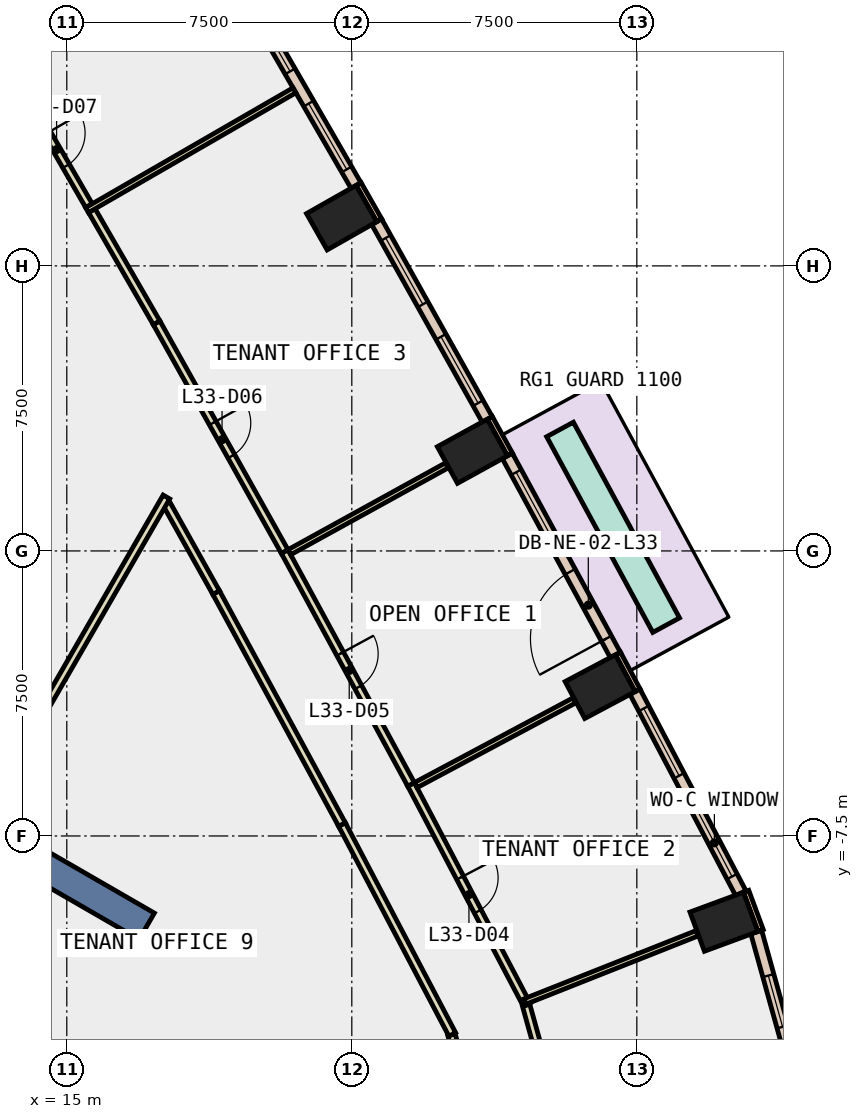
"""IFC4 building model, lengths in metres.
Left out: names, types, materials, properties, quantities, classifications, styles, units other than length and angle.
Written with IfcOpenShell. Run it as: python <this file> out.ifc"""

import sys

from ifc_helpers import new_model, si_unit, direction, frame, frame_2d, origin, origin_2d, place, context, subcontext, project, spatial, rectangle, extrude, element, fill, save


model = new_model("IFC4")
c1 = context("Model", 3, precision=1e-05, world=origin(), true_north=direction((0.0, 1.0)))
c2 = subcontext(c1, "Body", "Model", "MODEL_VIEW")
j1 = project(units=[si_unit("LENGTHUNIT", "METRE"), si_unit("PLANEANGLEUNIT", "RADIAN")], contexts=[c1])
p1 = place(None, origin())
s1 = spatial("IfcSite", under=j1, at=p1, CompositionType="ELEMENT")
p2 = place(p1, origin())
s2 = spatial("IfcBuilding", under=s1, at=p2, CompositionType="ELEMENT")
p3 = place(p2, frame((0.0, 0.0, 150.8)))
s3 = spatial("IfcBuildingStorey", under=s2, at=p3, CompositionType="ELEMENT", Elevation=150.8)
for number, where, z_axis, x_axis in (
    (1, (32.292, -9.758, -0.4), (0.0, 0.0, 1.0), (-0.347, 0.938, 0.0)),
    (2, (29.034, -3.571, -0.4), (0.0, 0.0, 1.0), (-0.47, 0.883, 0.0)),
    (3, (25.673, 2.622, -0.4), (0.0, 0.0, 1.0), (-0.482, 0.876, 0.0)),
    (4, (22.232, 8.769, -0.4), (0.0, 0.0, 1.0), (-0.494, 0.869, 0.0)),
):
    element("IfcColumn", number, at=place(p3, frame(where, z_axis=z_axis, x_axis=x_axis)), inside=s3, PredefinedType="COLUMN", context=c2, shape_type="SweptSolid", body=[
        extrude(rectangle(XDim=1.1, YDim=1.5, at=origin_2d()), origin(), (0.0, 0.0, 1.0), 4.2),
    ])
p4 = place(p3, frame((9.31, -5.375, -0.4), z_axis=(0.0, 0.0, 1.0), x_axis=(0.866017533419, -0.500013631625, 0.0)))
e5 = element("IfcWall", 5, at=p4, inside=s3, PredefinedType="SHEAR", context=c2, shape_type="SweptSolid", body=[
    extrude(rectangle(XDim=9.0, YDim=0.8, at=frame_2d((4.5, 0.0))), origin(), (0.0, 0.0, 1.0), 4.2),
])
for number, where, z_axis, x_axis in (
    (6, (33.256, -9.988, 0.0), (0.0, 0.0, 1.0), (-0.346, 0.938, 0.0)),
    (7, (30.02, -3.669, 0.0), (0.0, 0.0, 1.0), (-0.47, 0.883, 0.0)),
):
    element("IfcWall", number, at=place(p3, frame(where, z_axis=z_axis, x_axis=x_axis)), inside=s3, PredefinedType="STANDARD", context=c2, shape_type="SweptSolid", body=[
        extrude(rectangle(XDim=1.1, YDim=0.15, at=frame_2d((0.55, 0.0))), origin(), (0.0, 0.0, 1.0), 3.8),
    ])
for number, where, z_axis, x_axis in (
    (8, (26.661, 2.538, 0.0), (0.0, 0.0, 1.0), (-0.482, 0.876, 0.0)),
    (9, (23.222, 8.699, 0.0), (0.0, 0.0, 1.0), (-0.495, 0.869, 0.0)),
):
    element("IfcWall", number, at=place(p3, frame(where, z_axis=z_axis, x_axis=x_axis)), inside=s3, PredefinedType="STANDARD", context=c2, shape_type="SweptSolid", body=[
        extrude(rectangle(XDim=1.1, YDim=0.15, at=frame_2d((0.55, 0.0))), origin(), (0.0, 0.0, 1.0), 3.8),
    ])
p5 = place(p3, frame((34.154, -13.667, 0.0), z_axis=(0.0, 0.0, 1.0), x_axis=(-0.26799398221, 0.963420585985, 0.0)))
e10 = element("IfcWall", 10, at=p5, inside=s3, PredefinedType="STANDARD", context=c2, shape_type="SweptSolid", body=[
    extrude(rectangle(XDim=3.776, YDim=0.3, at=frame_2d((1.888, 0.0))), origin(), (0.0, 0.0, 1.0), 3.8),
])
p6 = place(p5, frame((1.188, 0.0, 0.9)))
e11 = element("IfcOpeningElement", 11, at=p6, cuts=e10, PredefinedType="OPENING", context=c2, shape_type="SweptSolid", body=[
    extrude(rectangle(XDim=1.4, YDim=2.6, at=frame_2d((0.7, 1.3))), frame((0.0, 0.16, 0.0), z_axis=(0.0, -1.0, 0.0), x_axis=(1.0, 0.0, 0.0)), (0.0, 0.0, 1.0), 0.32),
])
p7 = place(p3, frame((32.737, -9.008, 0.0), z_axis=(0.0, 0.0, 1.0), x_axis=(-0.465104650407, 0.885255705528, 0.0)))
e12 = element("IfcWall", 12, at=p7, inside=s3, PredefinedType="STANDARD", context=c2, shape_type="SweptSolid", body=[
    extrude(rectangle(XDim=5.99, YDim=0.3, at=frame_2d((2.995, 0.0))), origin(), (0.0, 0.0, 1.0), 3.8),
])
p8 = place(p7, frame((0.498, 0.0, 0.9)))
e13 = element("IfcOpeningElement", 13, at=p8, cuts=e12, PredefinedType="OPENING", context=c2, shape_type="SweptSolid", body=[
    extrude(rectangle(XDim=2.0, YDim=2.6, at=frame_2d((1.0, 1.3))), frame((0.0, 0.16, 0.0), z_axis=(0.0, -1.0, 0.0), x_axis=(1.0, 0.0, 0.0)), (0.0, 0.0, 1.0), 0.32),
])
p9 = place(p7, frame((3.493, 0.0, 0.9)))
e14 = element("IfcOpeningElement", 14, at=p9, cuts=e12, PredefinedType="OPENING", context=c2, shape_type="SweptSolid", body=[
    extrude(rectangle(XDim=2.0, YDim=2.6, at=frame_2d((1.0, 1.3))), frame((0.0, 0.16, 0.0), z_axis=(0.0, -1.0, 0.0), x_axis=(1.0, 0.0, 0.0)), (0.0, 0.0, 1.0), 0.32),
])
p10 = place(p3, frame((29.434, -2.736, 0.0), z_axis=(0.0, 0.0, 1.0), x_axis=(-0.476970695077, 0.878919197673, 0.0)))
e15 = element("IfcWall", 15, at=p10, inside=s3, PredefinedType="STANDARD", context=c2, shape_type="SweptSolid", body=[
    extrude(rectangle(XDim=5.958, YDim=0.3, at=frame_2d((2.979, 0.0))), origin(), (0.0, 0.0, 1.0), 3.8),
])
p11 = place(p10, frame((0.49, 0.0, 0.0)))
e16 = element("IfcOpeningElement", 16, at=p11, cuts=e15, PredefinedType="OPENING", context=c2, shape_type="SweptSolid", body=[
    extrude(rectangle(XDim=2.0, YDim=2.4, at=frame_2d((1.0, 1.2))), frame((0.0, 0.16, 0.0), z_axis=(0.0, -1.0, 0.0), x_axis=(1.0, 0.0, 0.0)), (0.0, 0.0, 1.0), 0.32),
])
p12 = place(p10, frame((3.469, 0.0, 0.9)))
e17 = element("IfcOpeningElement", 17, at=p12, cuts=e15, PredefinedType="OPENING", context=c2, shape_type="SweptSolid", body=[
    extrude(rectangle(XDim=2.0, YDim=2.6, at=frame_2d((1.0, 1.3))), frame((0.0, 0.16, 0.0), z_axis=(0.0, -1.0, 0.0), x_axis=(1.0, 0.0, 0.0)), (0.0, 0.0, 1.0), 0.32),
])
p13 = place(p3, frame((26.062, 3.463, 0.0), z_axis=(0.0, 0.0, 1.0), x_axis=(-0.488354983501, 0.872645065356, 0.0)))
e18 = element("IfcWall", 18, at=p13, inside=s3, PredefinedType="STANDARD", context=c2, shape_type="SweptSolid", body=[
    extrude(rectangle(XDim=5.957, YDim=0.3, at=frame_2d((2.978, 0.0))), origin(), (0.0, 0.0, 1.0), 3.8),
])
p14 = place(p13, frame((0.489, 0.0, 0.9)))
e19 = element("IfcOpeningElement", 19, at=p14, cuts=e18, PredefinedType="OPENING", context=c2, shape_type="SweptSolid", body=[
    extrude(rectangle(XDim=2.0, YDim=2.6, at=frame_2d((1.0, 1.3))), frame((0.0, 0.16, 0.0), z_axis=(0.0, -1.0, 0.0), x_axis=(1.0, 0.0, 0.0)), (0.0, 0.0, 1.0), 0.32),
])
p15 = place(p13, frame((3.467, 0.0, 0.9)))
e20 = element("IfcOpeningElement", 20, at=p15, cuts=e18, PredefinedType="OPENING", context=c2, shape_type="SweptSolid", body=[
    extrude(rectangle(XDim=2.0, YDim=2.6, at=frame_2d((1.0, 1.3))), frame((0.0, 0.16, 0.0), z_axis=(0.0, -1.0, 0.0), x_axis=(1.0, 0.0, 0.0)), (0.0, 0.0, 1.0), 0.32),
])
p16 = place(p3, frame((22.61, 9.615, 0.0), z_axis=(0.0, 0.0, 1.0), x_axis=(-0.500061823953, 0.865989706766, 0.0)))
e21 = element("IfcWall", 21, at=p16, inside=s3, PredefinedType="STANDARD", context=c2, shape_type="SweptSolid", body=[
    extrude(rectangle(XDim=5.957, YDim=0.3, at=frame_2d((2.979, 0.0))), origin(), (0.0, 0.0, 1.0), 3.8),
])
p17 = place(p16, frame((0.489, 0.0, 0.9)))
e22 = element("IfcOpeningElement", 22, at=p17, cuts=e21, PredefinedType="OPENING", context=c2, shape_type="SweptSolid", body=[
    extrude(rectangle(XDim=2.0, YDim=2.6, at=frame_2d((1.0, 1.3))), frame((0.0, 0.16, 0.0), z_axis=(0.0, -1.0, 0.0), x_axis=(1.0, 0.0, 0.0)), (0.0, 0.0, 1.0), 0.32),
])
p18 = place(p16, frame((3.468, 0.0, 0.9)))
e23 = element("IfcOpeningElement", 23, at=p18, cuts=e21, PredefinedType="OPENING", context=c2, shape_type="SweptSolid", body=[
    extrude(rectangle(XDim=2.0, YDim=2.6, at=frame_2d((1.0, 1.3))), frame((0.0, 0.16, 0.0), z_axis=(0.0, -1.0, 0.0), x_axis=(1.0, 0.0, 0.0)), (0.0, 0.0, 1.0), 0.32),
])
p19 = place(p3, frame((30.772, -1.953, 0.0), z_axis=(0.0, 0.0, 1.0), x_axis=(-0.476806707813, 0.87900817026, 0.0)))
e24 = element("IfcWall", 24, at=p19, inside=s3, PredefinedType="STANDARD", context=c2, shape_type="SweptSolid", body=[
    extrude(rectangle(XDim=5.858, YDim=0.8, at=frame_2d((2.929, 0.0))), origin(), (0.0, 0.0, 1.0), 0.8),
])
p20 = place(p3, frame((25.586, -14.393, 0.0), z_axis=(0.0, 0.0, 1.0), x_axis=(-0.268139825244, 0.963380005044, 0.0)))
e25 = element("IfcWall", 25, at=p20, inside=s3, PredefinedType="PARTITIONING", context=c2, shape_type="SweptSolid", body=[
    extrude(rectangle(XDim=1.726, YDim=0.2, at=frame_2d((0.863, 0.0))), origin(), (0.0, 0.0, 1.0), 3.8),
])
p21 = place(p3, frame((25.143, -12.722, 0.0), z_axis=(0.0, 0.0, 1.0), x_axis=(-0.465089990515, 0.885263407536, 0.0)))
e26 = element("IfcWall", 26, at=p21, inside=s3, PredefinedType="PARTITIONING", context=c2, shape_type="SweptSolid", body=[
    extrude(rectangle(XDim=6.24, YDim=0.2, at=frame_2d((3.12, 0.0))), origin(), (0.0, 0.0, 1.0), 3.8),
])
p22 = place(p3, frame((22.241, -7.198, 0.0), z_axis=(0.0, 0.0, 1.0), x_axis=(-0.476865268044, 0.878976402489, 0.0)))
e27 = element("IfcWall", 27, at=p22, inside=s3, PredefinedType="PARTITIONING", context=c2, shape_type="SweptSolid", body=[
    extrude(rectangle(XDim=6.943, YDim=0.2, at=frame_2d((3.472, 0.0))), origin(), (0.0, 0.0, 1.0), 3.8),
])
p23 = place(p3, frame((18.93, -1.095, 0.0), z_axis=(0.0, 0.0, 1.0), x_axis=(-0.488268004118, 0.872693735599, 0.0)))
e28 = element("IfcWall", 28, at=p23, inside=s3, PredefinedType="PARTITIONING", context=c2, shape_type="SweptSolid", body=[
    extrude(rectangle(XDim=2.683, YDim=0.2, at=frame_2d((1.341, 0.0))), origin(), (0.0, 0.0, 1.0), 3.8),
])
p24 = place(p3, frame((27.086, -11.952, 0.0), z_axis=(0.0, 0.0, 1.0), x_axis=(0.267909096687, -0.963444194498, 0.0)))
e29 = element("IfcWall", 29, at=p24, inside=s3, PredefinedType="PARTITIONING", context=c2, shape_type="SweptSolid", body=[
    extrude(rectangle(XDim=2.516, YDim=0.2, at=frame_2d((1.258, 0.0))), origin(), (0.0, 0.0, 1.0), 3.8),
])
p25 = place(p3, frame((24.059, -6.143, 0.0), z_axis=(0.0, 0.0, 1.0), x_axis=(0.464993808059, -0.885313932154, 0.0)))
e30 = element("IfcWall", 30, at=p25, inside=s3, PredefinedType="PARTITIONING", context=c2, shape_type="SweptSolid", body=[
    extrude(rectangle(XDim=6.552, YDim=0.2, at=frame_2d((3.276, 0.0))), origin(), (0.0, 0.0, 1.0), 3.8),
])
p26 = place(p25, frame((2.776, 0.0, 0.0)))
e31 = element("IfcOpeningElement", 31, at=p26, cuts=e30, PredefinedType="OPENING", context=c2, shape_type="SweptSolid", body=[
    extrude(rectangle(XDim=1.0, YDim=2.1, at=frame_2d((0.5, 1.05))), frame((0.0, 0.11, 0.0), z_axis=(0.0, -1.0, 0.0), x_axis=(1.0, 0.0, 0.0)), (0.0, 0.0, 1.0), 0.22),
])
p27 = place(p3, frame((20.733, -0.016, 0.0), z_axis=(0.0, 0.0, 1.0), x_axis=(0.477104227839, -0.87884671916, 0.0)))
e32 = element("IfcWall", 32, at=p27, inside=s3, PredefinedType="PARTITIONING", context=c2, shape_type="SweptSolid", body=[
    extrude(rectangle(XDim=6.972, YDim=0.2, at=frame_2d((3.486, 0.0))), origin(), (0.0, 0.0, 1.0), 3.8),
])
p28 = place(p27, frame((3.061, 0.0, 0.0)))
e33 = element("IfcOpeningElement", 33, at=p28, cuts=e32, PredefinedType="OPENING", context=c2, shape_type="SweptSolid", body=[
    extrude(rectangle(XDim=1.0, YDim=2.1, at=frame_2d((0.5, 1.05))), frame((0.0, 0.11, 0.0), z_axis=(0.0, -1.0, 0.0), x_axis=(1.0, 0.0, 0.0)), (0.0, 0.0, 1.0), 0.22),
])
p29 = place(p3, frame((15.659, 8.954, 0.0), z_axis=(0.0, 0.0, 1.0), x_axis=(0.50001992892, -0.866013897511, 0.0)))
e34 = element("IfcWall", 34, at=p29, inside=s3, PredefinedType="PARTITIONING", context=c2, shape_type="SweptSolid", body=[
    extrude(rectangle(XDim=3.41, YDim=0.2, at=frame_2d((1.705, 0.0))), origin(), (0.0, 0.0, 1.0), 3.8),
])
p30 = place(p3, frame((17.364, 6.001, 0.0), z_axis=(0.0, 0.0, 1.0), x_axis=(0.488528981592, -0.872547668695, 0.0)))
e35 = element("IfcWall", 35, at=p30, inside=s3, PredefinedType="PARTITIONING", context=c2, shape_type="SweptSolid", body=[
    extrude(rectangle(XDim=6.896, YDim=0.2, at=frame_2d((3.448, 0.0))), origin(), (0.0, 0.0, 1.0), 3.8),
])
p31 = place(p30, frame((3.023, 0.0, 0.0)))
e36 = element("IfcOpeningElement", 36, at=p31, cuts=e35, PredefinedType="OPENING", context=c2, shape_type="SweptSolid", body=[
    extrude(rectangle(XDim=1.0, YDim=2.1, at=frame_2d((0.5, 1.05))), frame((0.0, 0.11, 0.0), z_axis=(0.0, -1.0, 0.0), x_axis=(1.0, 0.0, 0.0)), (0.0, 0.0, 1.0), 0.22),
])
p32 = place(p3, frame((13.879, 12.037, 0.0), z_axis=(0.0, 0.0, 1.0), x_axis=(0.50001992892, -0.866013897511, 0.0)))
e37 = element("IfcWall", 37, at=p32, inside=s3, PredefinedType="PARTITIONING", context=c2, shape_type="SweptSolid", body=[
    extrude(rectangle(XDim=3.41, YDim=0.2, at=frame_2d((1.705, 0.0))), origin(), (0.0, 0.0, 1.0), 3.8),
])
p33 = place(p32, frame((1.205, 0.0, 0.0)))
e38 = element("IfcOpeningElement", 38, at=p33, cuts=e37, PredefinedType="OPENING", context=c2, shape_type="SweptSolid", body=[
    extrude(rectangle(XDim=1.0, YDim=2.1, at=frame_2d((0.5, 1.05))), frame((0.0, 0.11, 0.0), z_axis=(0.0, -1.0, 0.0), x_axis=(1.0, 0.0, 0.0)), (0.0, 0.0, 1.0), 0.22),
])
p34 = place(p3, frame((17.621, 1.42, 0.0), z_axis=(0.0, 0.0, 1.0), x_axis=(-0.499987708133, -0.866032500381, 0.0)))
e39 = element("IfcWall", 39, at=p34, inside=s3, PredefinedType="PARTITIONING", context=c2, shape_type="SweptSolid", body=[
    extrude(rectangle(XDim=9.64, YDim=0.2, at=frame_2d((4.82, 0.0))), origin(), (0.0, 0.0, 1.0), 3.8),
])
p35 = place(p3, frame((27.059, -11.855, 0.0), z_axis=(0.0, 0.0, 1.0), x_axis=(0.92964843089, 0.368447818481, 0.0)))
e40 = element("IfcWall", 40, at=p35, inside=s3, PredefinedType="PARTITIONING", context=c2, shape_type="SweptSolid", body=[
    extrude(rectangle(XDim=4.866, YDim=0.15, at=frame_2d((2.433, 0.0))), origin(), (0.0, 0.0, 1.0), 3.8),
])
p36 = place(p3, frame((24.182, -6.162, 0.0), z_axis=(0.0, 0.0, 1.0), x_axis=(0.88214427755, 0.470979270866, 0.0)))
e41 = element("IfcWall", 41, at=p36, inside=s3, PredefinedType="PARTITIONING", context=c2, shape_type="SweptSolid", body=[
    extrude(rectangle(XDim=4.731, YDim=0.15, at=frame_2d((2.365, 0.0))), origin(), (0.0, 0.0, 1.0), 3.8),
])
p37 = place(p3, frame((20.857, -0.033, 0.0), z_axis=(0.0, 0.0, 1.0), x_axis=(0.875786153174, 0.482699299677, 0.0)))
e42 = element("IfcWall", 42, at=p37, inside=s3, PredefinedType="PARTITIONING", context=c2, shape_type="SweptSolid", body=[
    extrude(rectangle(XDim=4.729, YDim=0.15, at=frame_2d((2.365, 0.0))), origin(), (0.0, 0.0, 1.0), 3.8),
])
p38 = place(p3, frame((15.535, 8.969, 0.0), z_axis=(0.0, 0.0, 1.0), x_axis=(0.865951968193, 0.500127172609, 0.0)))
e43 = element("IfcWall", 43, at=p38, inside=s3, PredefinedType="PARTITIONING", context=c2, shape_type="SweptSolid", body=[
    extrude(rectangle(XDim=6.301, YDim=0.15, at=frame_2d((3.15, 0.0))), origin(), (0.0, 0.0, 1.0), 3.8),
])
p39 = place(p6, origin())
e44 = element("IfcWindow", 44, at=p39, inside=s3, PartitioningType="SINGLE_PANEL", PredefinedType="WINDOW", context=c2, shape_type="SweptSolid", body=[
    extrude(rectangle(XDim=1.4, YDim=2.6, at=frame_2d((0.7, 1.3))), frame((0.0, 0.03, 0.0), z_axis=(0.0, -1.0, 0.0), x_axis=(1.0, 0.0, 0.0)), (0.0, 0.0, 1.0), 0.06),
])
fill(e11, e44)
p40 = place(p8, origin())
e45 = element("IfcWindow", 45, at=p40, inside=s3, PartitioningType="SINGLE_PANEL", PredefinedType="WINDOW", context=c2, shape_type="SweptSolid", body=[
    extrude(rectangle(XDim=2.0, YDim=2.6, at=frame_2d((1.0, 1.3))), frame((0.0, 0.03, 0.0), z_axis=(0.0, -1.0, 0.0), x_axis=(1.0, 0.0, 0.0)), (0.0, 0.0, 1.0), 0.06),
])
fill(e13, e45)
p41 = place(p9, origin())
e46 = element("IfcWindow", 46, at=p41, inside=s3, PartitioningType="SINGLE_PANEL", PredefinedType="WINDOW", context=c2, shape_type="SweptSolid", body=[
    extrude(rectangle(XDim=2.0, YDim=2.6, at=frame_2d((1.0, 1.3))), frame((0.0, 0.03, 0.0), z_axis=(0.0, -1.0, 0.0), x_axis=(1.0, 0.0, 0.0)), (0.0, 0.0, 1.0), 0.06),
])
fill(e14, e46)
p42 = place(p11, origin())
e47 = element("IfcDoor", 47, at=p42, inside=s3, OperationType="SLIDING_TO_LEFT", PredefinedType="DOOR", context=c2, shape_type="SweptSolid", body=[
    extrude(rectangle(XDim=2.0, YDim=2.4, at=frame_2d((1.0, 1.2))), frame((0.0, 0.025, 0.0), z_axis=(0.0, -1.0, 0.0), x_axis=(1.0, 0.0, 0.0)), (0.0, 0.0, 1.0), 0.05),
])
fill(e16, e47)
p43 = place(p12, origin())
e48 = element("IfcWindow", 48, at=p43, inside=s3, PartitioningType="SINGLE_PANEL", PredefinedType="WINDOW", context=c2, shape_type="SweptSolid", body=[
    extrude(rectangle(XDim=2.0, YDim=2.6, at=frame_2d((1.0, 1.3))), frame((0.0, 0.03, 0.0), z_axis=(0.0, -1.0, 0.0), x_axis=(1.0, 0.0, 0.0)), (0.0, 0.0, 1.0), 0.06),
])
fill(e17, e48)
p44 = place(p14, origin())
e49 = element("IfcWindow", 49, at=p44, inside=s3, PartitioningType="SINGLE_PANEL", PredefinedType="WINDOW", context=c2, shape_type="SweptSolid", body=[
    extrude(rectangle(XDim=2.0, YDim=2.6, at=frame_2d((1.0, 1.3))), frame((0.0, 0.03, 0.0), z_axis=(0.0, -1.0, 0.0), x_axis=(1.0, 0.0, 0.0)), (0.0, 0.0, 1.0), 0.06),
])
fill(e19, e49)
p45 = place(p15, origin())
e50 = element("IfcWindow", 50, at=p45, inside=s3, PartitioningType="SINGLE_PANEL", PredefinedType="WINDOW", context=c2, shape_type="SweptSolid", body=[
    extrude(rectangle(XDim=2.0, YDim=2.6, at=frame_2d((1.0, 1.3))), frame((0.0, 0.03, 0.0), z_axis=(0.0, -1.0, 0.0), x_axis=(1.0, 0.0, 0.0)), (0.0, 0.0, 1.0), 0.06),
])
fill(e20, e50)
p46 = place(p17, origin())
e51 = element("IfcWindow", 51, at=p46, inside=s3, PartitioningType="SINGLE_PANEL", PredefinedType="WINDOW", context=c2, shape_type="SweptSolid", body=[
    extrude(rectangle(XDim=2.0, YDim=2.6, at=frame_2d((1.0, 1.3))), frame((0.0, 0.03, 0.0), z_axis=(0.0, -1.0, 0.0), x_axis=(1.0, 0.0, 0.0)), (0.0, 0.0, 1.0), 0.06),
])
fill(e22, e51)
p47 = place(p18, origin())
e52 = element("IfcWindow", 52, at=p47, inside=s3, PartitioningType="SINGLE_PANEL", PredefinedType="WINDOW", context=c2, shape_type="SweptSolid", body=[
    extrude(rectangle(XDim=2.0, YDim=2.6, at=frame_2d((1.0, 1.3))), frame((0.0, 0.03, 0.0), z_axis=(0.0, -1.0, 0.0), x_axis=(1.0, 0.0, 0.0)), (0.0, 0.0, 1.0), 0.06),
])
fill(e23, e52)
p48 = place(p26, origin())
e53 = element("IfcDoor", 53, at=p48, inside=s3, OperationType="SINGLE_SWING_LEFT", PredefinedType="DOOR", context=c2, shape_type="SweptSolid", body=[
    extrude(rectangle(XDim=1.0, YDim=2.1, at=frame_2d((0.5, 1.05))), frame((0.0, 0.025, 0.0), z_axis=(0.0, -1.0, 0.0), x_axis=(1.0, 0.0, 0.0)), (0.0, 0.0, 1.0), 0.05),
])
fill(e31, e53)
p49 = place(p28, origin())
e54 = element("IfcDoor", 54, at=p49, inside=s3, OperationType="SINGLE_SWING_LEFT", PredefinedType="DOOR", context=c2, shape_type="SweptSolid", body=[
    extrude(rectangle(XDim=1.0, YDim=2.1, at=frame_2d((0.5, 1.05))), frame((0.0, 0.025, 0.0), z_axis=(0.0, -1.0, 0.0), x_axis=(1.0, 0.0, 0.0)), (0.0, 0.0, 1.0), 0.05),
])
fill(e33, e54)
p50 = place(p31, origin())
e55 = element("IfcDoor", 55, at=p50, inside=s3, OperationType="SINGLE_SWING_LEFT", PredefinedType="DOOR", context=c2, shape_type="SweptSolid", body=[
    extrude(rectangle(XDim=1.0, YDim=2.1, at=frame_2d((0.5, 1.05))), frame((0.0, 0.025, 0.0), z_axis=(0.0, -1.0, 0.0), x_axis=(1.0, 0.0, 0.0)), (0.0, 0.0, 1.0), 0.05),
])
fill(e36, e55)
p51 = place(p33, origin())
e56 = element("IfcDoor", 56, at=p51, inside=s3, OperationType="SINGLE_SWING_LEFT", PredefinedType="DOOR", context=c2, shape_type="SweptSolid", body=[
    extrude(rectangle(XDim=1.0, YDim=2.1, at=frame_2d((0.5, 1.05))), frame((0.0, 0.025, 0.0), z_axis=(0.0, -1.0, 0.0), x_axis=(1.0, 0.0, 0.0)), (0.0, 0.0, 1.0), 0.05),
])
fill(e38, e56)
save(model, sys.argv[1])
